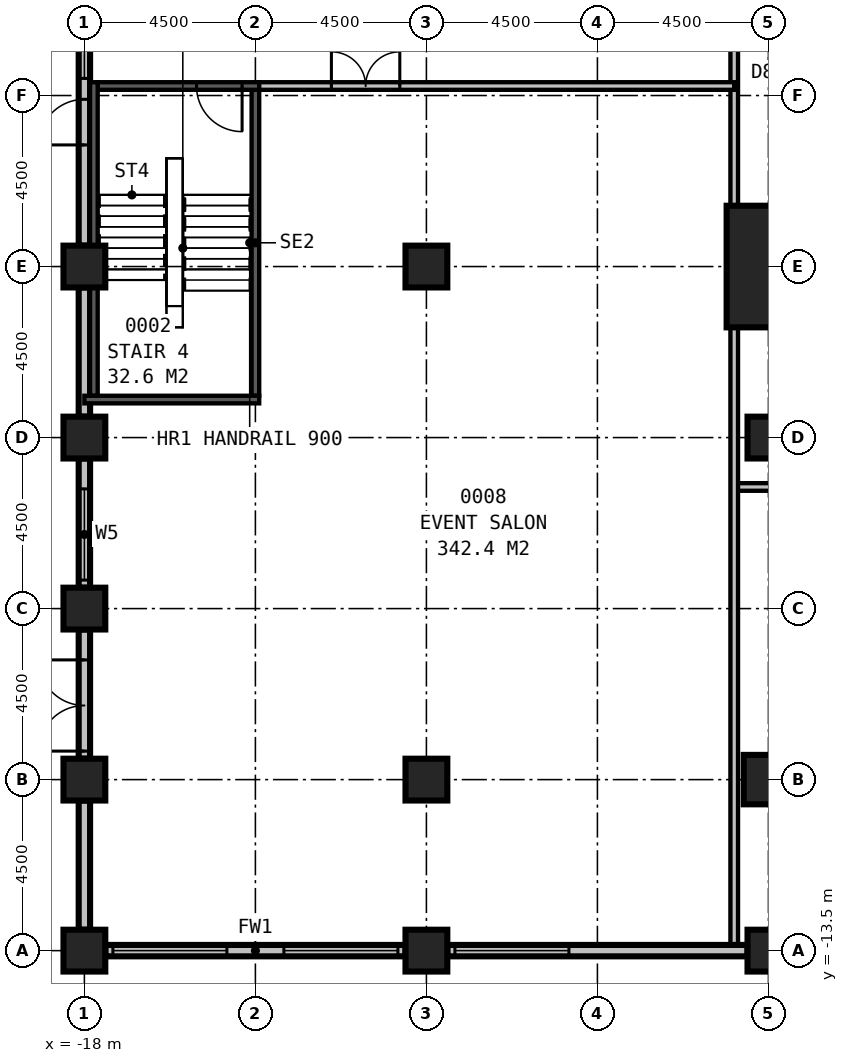
"""IFC4 building model, lengths in metres.
Left out: names, types, materials, properties, quantities, classifications, styles, units other than length and angle.
Written with IfcOpenShell. Run it as: python <this file> out.ifc"""

import sys

from ifc_helpers import new_model, si_unit, direction, frame, frame_2d, origin, origin_2d, place, context, subcontext, project, spatial, rectangle, extrude, element, fill, save


model = new_model("IFC4")
c1 = context("Model", 3, precision=1e-05, world=origin(), true_north=direction((0.0, 1.0)))
c2 = subcontext(c1, "Body", "Model", "MODEL_VIEW")
j1 = project(units=[si_unit("LENGTHUNIT", "METRE"), si_unit("PLANEANGLEUNIT", "RADIAN")], contexts=[c1])
p1 = place(None, origin())
s1 = spatial("IfcSite", under=j1, at=p1, CompositionType="ELEMENT")
p2 = place(p1, origin())
s2 = spatial("IfcBuilding", under=s1, at=p2, CompositionType="ELEMENT")
p3 = place(p2, origin())
s3 = spatial("IfcBuildingStorey", under=s2, at=p3, CompositionType="ELEMENT", Elevation=0.0)
p4 = place(p3, frame((0.5, 4.5, 0.0), z_axis=(0.0, 0.0, 1.0), x_axis=(1.0, 0.0, 0.0)))
e1 = element("IfcColumn", 1, at=p4, inside=s3, PredefinedType="COLUMN", context=c2, shape_type="SweptSolid", body=[
    extrude(rectangle(XDim=3.2, YDim=3.2, at=origin_2d()), origin(), (0.0, 0.0, 1.0), 6.0),
])
for number, where, z_axis, x_axis in (
    (2, (-18.0, -13.5, 0.0), (0.0, 0.0, 1.0), (1.0, 0.0, 0.0)),
    (3, (-9.0, -13.5, 0.0), (0.0, 0.0, 1.0), (1.0, 0.0, 0.0)),
    (4, (-18.0, -4.5, 0.0), (0.0, 0.0, 1.0), (1.0, 0.0, 0.0)),
    (5, (-18.0, 4.5, 0.0), (0.0, 0.0, 1.0), (1.0, 0.0, 0.0)),
    (6, (-9.0, 4.5, 0.0), (0.0, 0.0, 1.0), (1.0, 0.0, 0.0)),
    (7, (-18.0, 0.0, 0.0), (0.0, 0.0, 1.0), (1.0, 0.0, 0.0)),
    (8, (0.0, -13.5, 0.0), (0.0, 0.0, 1.0), (1.0, 0.0, 0.0)),
):
    element("IfcColumn", number, at=place(p3, frame(where, z_axis=z_axis, x_axis=x_axis)), inside=s3, PredefinedType="COLUMN", context=c2, shape_type="SweptSolid", body=[
        extrude(rectangle(XDim=1.1, YDim=1.1, at=origin_2d()), origin(), (0.0, 0.0, 1.0), 6.0),
    ])
p5 = place(p3, frame((0.0, -9.0, 0.0), z_axis=(0.0, 0.0, 1.0), x_axis=(1.0, 0.0, 0.0)))
e9 = element("IfcColumn", 9, at=p5, inside=s3, PredefinedType="COLUMN", context=c2, shape_type="SweptSolid", body=[
    extrude(rectangle(XDim=1.3, YDim=1.3, at=origin_2d()), origin(), (0.0, 0.0, 1.0), 6.0),
])
for number, where, z_axis, x_axis in (
    (10, (-18.0, -9.0, 0.0), (0.0, 0.0, 1.0), (1.0, 0.0, 0.0)),
    (11, (-9.0, -9.0, 0.0), (0.0, 0.0, 1.0), (1.0, 0.0, 0.0)),
    (12, (0.0, 0.0, 0.0), (0.0, 0.0, 1.0), (1.0, 0.0, 0.0)),
):
    element("IfcColumn", number, at=place(p3, frame(where, z_axis=z_axis, x_axis=x_axis)), inside=s3, PredefinedType="COLUMN", context=c2, shape_type="SweptSolid", body=[
        extrude(rectangle(XDim=1.1, YDim=1.1, at=origin_2d()), origin(), (0.0, 0.0, 1.0), 6.0),
    ])
p6 = place(p3, frame((-17.45, -13.5, 0.0), z_axis=(0.0, 0.0, 1.0), x_axis=(1.0, 0.0, 0.0)))
e13 = element("IfcWall", 13, at=p6, inside=s3, PredefinedType="STANDARD", context=c2, shape_type="SweptSolid", body=[
    extrude(rectangle(XDim=7.9, YDim=0.3, at=frame_2d((3.95, 0.0))), origin(), (0.0, 0.0, 1.0), 4.1),
])
p7 = place(p6, frame((0.2, 0.0, 0.5)))
e14 = element("IfcOpeningElement", 14, at=p7, cuts=e13, PredefinedType="OPENING", context=c2, shape_type="SweptSolid", body=[
    extrude(rectangle(XDim=3.0, YDim=3.0, at=frame_2d((1.5, 1.5))), frame((0.0, 0.16, 0.0), z_axis=(0.0, -1.0, 0.0), x_axis=(1.0, 0.0, 0.0)), (0.0, 0.0, 1.0), 0.32),
])
p8 = place(p6, frame((4.7, 0.0, 0.5)))
e15 = element("IfcOpeningElement", 15, at=p8, cuts=e13, PredefinedType="OPENING", context=c2, shape_type="SweptSolid", body=[
    extrude(rectangle(XDim=3.0, YDim=3.0, at=frame_2d((1.5, 1.5))), frame((0.0, 0.16, 0.0), z_axis=(0.0, -1.0, 0.0), x_axis=(1.0, 0.0, 0.0)), (0.0, 0.0, 1.0), 0.32),
])
p9 = place(p3, frame((-8.45, -13.5, 0.0), z_axis=(0.0, 0.0, 1.0), x_axis=(1.0, 0.0, 0.0)))
e16 = element("IfcWall", 16, at=p9, inside=s3, PredefinedType="STANDARD", context=c2, shape_type="SweptSolid", body=[
    extrude(rectangle(XDim=7.9, YDim=0.3, at=frame_2d((3.95, 0.0))), origin(), (0.0, 0.0, 1.0), 4.1),
])
p10 = place(p9, frame((0.2, 0.0, 0.5)))
e17 = element("IfcOpeningElement", 17, at=p10, cuts=e16, PredefinedType="OPENING", context=c2, shape_type="SweptSolid", body=[
    extrude(rectangle(XDim=3.0, YDim=3.0, at=frame_2d((1.5, 1.5))), frame((0.0, 0.16, 0.0), z_axis=(0.0, -1.0, 0.0), x_axis=(1.0, 0.0, 0.0)), (0.0, 0.0, 1.0), 0.32),
])
p11 = place(p3, frame((-18.0, 12.95, 0.0), z_axis=(0.0, 0.0, 1.0), x_axis=(0.0, -1.0, 0.0)))
e18 = element("IfcWall", 18, at=p11, inside=s3, PredefinedType="STANDARD", context=c2, shape_type="SweptSolid", body=[
    extrude(rectangle(XDim=7.9, YDim=0.3, at=frame_2d((3.95, 0.0))), origin(), (0.0, 0.0, 1.0), 4.8),
])
p12 = place(p11, frame((5.25, 0.0, 0.0), z_axis=(0.0, 0.0, 1.0), x_axis=(-1.0, 0.0, 0.0)))
e19 = element("IfcOpeningElement", 19, at=p12, cuts=e18, PredefinedType="OPENING", context=c2, shape_type="SweptSolid", body=[
    extrude(rectangle(XDim=1.2, YDim=2.4, at=frame_2d((0.6, 1.2))), frame((0.0, 0.16, 0.0), z_axis=(0.0, -1.0, 0.0), x_axis=(1.0, 0.0, 0.0)), (0.0, 0.0, 1.0), 0.32),
])
p13 = place(p11, frame((0.5, 0.0, 0.5)))
e20 = element("IfcOpeningElement", 20, at=p13, cuts=e18, PredefinedType="OPENING", context=c2, shape_type="SweptSolid", body=[
    extrude(rectangle(XDim=3.0, YDim=3.0, at=frame_2d((1.5, 1.5))), frame((0.0, 0.16, 0.0), z_axis=(0.0, -1.0, 0.0), x_axis=(1.0, 0.0, 0.0)), (0.0, 0.0, 1.0), 0.32),
])
p14 = place(p3, frame((-18.0, 3.95, 0.0), z_axis=(0.0, 0.0, 1.0), x_axis=(0.0, -1.0, 0.0)))
e21 = element("IfcWall", 21, at=p14, inside=s3, PredefinedType="STANDARD", context=c2, shape_type="SweptSolid", body=[
    extrude(rectangle(XDim=3.4, YDim=0.3, at=frame_2d((1.7, 0.0))), origin(), (0.0, 0.0, 1.0), 4.8),
])
p15 = place(p3, frame((-18.0, -0.55, 0.0), z_axis=(0.0, 0.0, 1.0), x_axis=(0.0, -1.0, 0.0)))
e22 = element("IfcWall", 22, at=p15, inside=s3, PredefinedType="STANDARD", context=c2, shape_type="SweptSolid", body=[
    extrude(rectangle(XDim=3.4, YDim=0.3, at=frame_2d((1.7, 0.0))), origin(), (0.0, 0.0, 1.0), 4.8),
])
p16 = place(p15, frame((0.8, 0.0, 0.5)))
e23 = element("IfcOpeningElement", 23, at=p16, cuts=e22, PredefinedType="OPENING", context=c2, shape_type="SweptSolid", body=[
    extrude(rectangle(XDim=2.4, YDim=3.0, at=frame_2d((1.2, 1.5))), frame((0.0, 0.16, 0.0), z_axis=(0.0, -1.0, 0.0), x_axis=(1.0, 0.0, 0.0)), (0.0, 0.0, 1.0), 0.32),
])
p17 = place(p3, frame((-18.0, -5.05, 0.0), z_axis=(0.0, 0.0, 1.0), x_axis=(0.0, -1.0, 0.0)))
e24 = element("IfcWall", 24, at=p17, inside=s3, PredefinedType="STANDARD", context=c2, shape_type="SweptSolid", body=[
    extrude(rectangle(XDim=3.4, YDim=0.3, at=frame_2d((1.7, 0.0))), origin(), (0.0, 0.0, 1.0), 4.8),
])
p18 = place(p17, frame((3.2, 0.0, 0.0), z_axis=(0.0, 0.0, 1.0), x_axis=(-1.0, 0.0, 0.0)))
e25 = element("IfcOpeningElement", 25, at=p18, cuts=e24, PredefinedType="OPENING", context=c2, shape_type="SweptSolid", body=[
    extrude(rectangle(XDim=2.4, YDim=3.0, at=frame_2d((1.2, 1.5))), frame((0.0, 0.16, 0.0), z_axis=(0.0, -1.0, 0.0), x_axis=(1.0, 0.0, 0.0)), (0.0, 0.0, 1.0), 0.32),
])
p19 = place(p3, frame((-18.0, -9.55, 0.0), z_axis=(0.0, 0.0, 1.0), x_axis=(0.0, -1.0, 0.0)))
e26 = element("IfcWall", 26, at=p19, inside=s3, PredefinedType="STANDARD", context=c2, shape_type="SweptSolid", body=[
    extrude(rectangle(XDim=3.4, YDim=0.3, at=frame_2d((1.7, 0.0))), origin(), (0.0, 0.0, 1.0), 4.8),
])
p20 = place(p3, frame((-17.65, 9.25, 0.0), z_axis=(0.0, 0.0, 1.0), x_axis=(1.0, 0.0, 0.0)))
e27 = element("IfcWall", 27, at=p20, inside=s3, PredefinedType="SOLIDWALL", context=c2, shape_type="SweptSolid", body=[
    extrude(rectangle(XDim=4.25, YDim=0.2, at=frame_2d((2.125, 0.0))), origin(), (0.0, 0.0, 1.0), 5.7),
])
p21 = place(p20, frame((3.8, 0.0, 0.0), z_axis=(0.0, 0.0, 1.0), x_axis=(-1.0, 0.0, 0.0)))
e28 = element("IfcOpeningElement", 28, at=p21, cuts=e27, PredefinedType="OPENING", context=c2, shape_type="SweptSolid", body=[
    extrude(rectangle(XDim=1.2, YDim=2.1, at=frame_2d((0.6, 1.05))), frame((0.0, 0.11, 0.0), z_axis=(0.0, -1.0, 0.0), x_axis=(1.0, 0.0, 0.0)), (0.0, 0.0, 1.0), 0.22),
])
p22 = place(p3, frame((-18.0, 1.0, 0.0), z_axis=(0.0, 0.0, 1.0), x_axis=(1.0, 0.0, 0.0)))
e29 = element("IfcWall", 29, at=p22, inside=s3, PredefinedType="SOLIDWALL", context=c2, shape_type="SweptSolid", body=[
    extrude(rectangle(XDim=4.6, YDim=0.2, at=frame_2d((2.3, 0.0))), origin(), (0.0, 0.0, 1.0), 5.7),
])
p23 = place(p3, frame((-13.5, 1.1, 0.0), z_axis=(0.0, 0.0, 1.0), x_axis=(0.0, 1.0, 0.0)))
e30 = element("IfcWall", 30, at=p23, inside=s3, PredefinedType="SOLIDWALL", context=c2, shape_type="SweptSolid", body=[
    extrude(rectangle(XDim=8.05, YDim=0.2, at=frame_2d((4.025, 0.0))), origin(), (0.0, 0.0, 1.0), 5.7),
])
p24 = place(p3, frame((-17.75, 1.1, 0.0), z_axis=(0.0, 0.0, 1.0), x_axis=(0.0, 1.0, 0.0)))
e31 = element("IfcWall", 31, at=p24, inside=s3, PredefinedType="SOLIDWALL", context=c2, shape_type="SweptSolid", body=[
    extrude(rectangle(XDim=2.85, YDim=0.2, at=frame_2d((1.425, 0.0))), origin(), (0.0, 0.0, 1.0), 5.7),
])
p25 = place(p3, frame((-17.75, 5.05, 0.0), z_axis=(0.0, 0.0, 1.0), x_axis=(0.0, 1.0, 0.0)))
e32 = element("IfcWall", 32, at=p25, inside=s3, PredefinedType="SOLIDWALL", context=c2, shape_type="SweptSolid", body=[
    extrude(rectangle(XDim=4.3, YDim=0.2, at=frame_2d((2.15, 0.0))), origin(), (0.0, 0.0, 1.0), 5.7),
])
p26 = place(p25, frame((2.65, 0.0, 0.0)))
e33 = element("IfcOpeningElement", 33, at=p26, cuts=e32, PredefinedType="OPENING", context=c2, shape_type="SweptSolid", body=[
    extrude(rectangle(XDim=1.2, YDim=2.4, at=frame_2d((0.6, 1.2))), frame((0.0, 0.11, 0.0), z_axis=(0.0, -1.0, 0.0), x_axis=(1.0, 0.0, 0.0)), (0.0, 0.0, 1.0), 0.22),
])
p27 = place(p3, frame((-0.9, -13.5, 0.0), z_axis=(0.0, 0.0, 1.0), x_axis=(0.0, 1.0, 0.0)))
e34 = element("IfcWall", 34, at=p27, inside=s3, PredefinedType="PARTITIONING", context=c2, shape_type="SweptSolid", body=[
    extrude(rectangle(XDim=23.9, YDim=0.2, at=frame_2d((11.95, 0.0))), origin(), (0.0, 0.0, 1.0), 4.8),
])
p28 = place(p3, frame((-13.5, 9.25, 0.0), z_axis=(0.0, 0.0, 1.0), x_axis=(1.0, 0.0, 0.0)))
e35 = element("IfcWall", 35, at=p28, inside=s3, PredefinedType="PARTITIONING", context=c2, shape_type="SweptSolid", body=[
    extrude(rectangle(XDim=12.6, YDim=0.2, at=frame_2d((6.3, 0.0))), origin(), (0.0, 0.0, 1.0), 5.7),
])
p29 = place(p28, frame((2.0, 0.0, 0.0)))
e36 = element("IfcOpeningElement", 36, at=p29, cuts=e35, PredefinedType="OPENING", context=c2, shape_type="SweptSolid", body=[
    extrude(rectangle(XDim=1.8, YDim=2.4, at=frame_2d((0.9, 1.2))), frame((0.0, 0.11, 0.0), z_axis=(0.0, -1.0, 0.0), x_axis=(1.0, 0.0, 0.0)), (0.0, 0.0, 1.0), 0.22),
])
p30 = place(p3, frame((-0.9, -1.3, 0.0), z_axis=(0.0, 0.0, 1.0), x_axis=(1.0, 0.0, 0.0)))
e37 = element("IfcWall", 37, at=p30, inside=s3, PredefinedType="PARTITIONING", context=c2, shape_type="SweptSolid", body=[
    extrude(rectangle(XDim=4.1, YDim=0.2, at=frame_2d((2.05, 0.0))), origin(), (0.0, 0.0, 1.0), 4.8),
])
p31 = place(p7, origin())
e38 = element("IfcWindow", 38, at=p31, inside=s3, PartitioningType="SINGLE_PANEL", PredefinedType="WINDOW", context=c2, shape_type="SweptSolid", body=[
    extrude(rectangle(XDim=3.0, YDim=3.0, at=frame_2d((1.5, 1.5))), frame((0.0, 0.03, 0.0), z_axis=(0.0, -1.0, 0.0), x_axis=(1.0, 0.0, 0.0)), (0.0, 0.0, 1.0), 0.06),
])
fill(e14, e38)
p32 = place(p8, origin())
e39 = element("IfcWindow", 39, at=p32, inside=s3, PartitioningType="SINGLE_PANEL", PredefinedType="WINDOW", context=c2, shape_type="SweptSolid", body=[
    extrude(rectangle(XDim=3.0, YDim=3.0, at=frame_2d((1.5, 1.5))), frame((0.0, 0.03, 0.0), z_axis=(0.0, -1.0, 0.0), x_axis=(1.0, 0.0, 0.0)), (0.0, 0.0, 1.0), 0.06),
])
fill(e15, e39)
p33 = place(p10, origin())
e40 = element("IfcWindow", 40, at=p33, inside=s3, PartitioningType="SINGLE_PANEL", PredefinedType="WINDOW", context=c2, shape_type="SweptSolid", body=[
    extrude(rectangle(XDim=3.0, YDim=3.0, at=frame_2d((1.5, 1.5))), frame((0.0, 0.03, 0.0), z_axis=(0.0, -1.0, 0.0), x_axis=(1.0, 0.0, 0.0)), (0.0, 0.0, 1.0), 0.06),
])
fill(e17, e40)
p34 = place(p12, origin())
e41 = element("IfcDoor", 41, at=p34, inside=s3, OperationType="SINGLE_SWING_LEFT", PredefinedType="DOOR", context=c2, shape_type="SweptSolid", body=[
    extrude(rectangle(XDim=1.2, YDim=2.4, at=frame_2d((0.6, 1.2))), frame((0.0, 0.025, 0.0), z_axis=(0.0, -1.0, 0.0), x_axis=(1.0, 0.0, 0.0)), (0.0, 0.0, 1.0), 0.05),
])
fill(e19, e41)
p35 = place(p18, origin())
e42 = element("IfcDoor", 42, at=p35, inside=s3, OperationType="DOUBLE_DOOR_SINGLE_SWING", PredefinedType="DOOR", context=c2, shape_type="SweptSolid", body=[
    extrude(rectangle(XDim=2.4, YDim=3.0, at=frame_2d((1.2, 1.5))), frame((0.0, 0.025, 0.0), z_axis=(0.0, -1.0, 0.0), x_axis=(1.0, 0.0, 0.0)), (0.0, 0.0, 1.0), 0.05),
])
fill(e25, e42)
p36 = place(p13, origin())
e43 = element("IfcWindow", 43, at=p36, inside=s3, PartitioningType="SINGLE_PANEL", PredefinedType="WINDOW", context=c2, shape_type="SweptSolid", body=[
    extrude(rectangle(XDim=3.0, YDim=3.0, at=frame_2d((1.5, 1.5))), frame((0.0, 0.03, 0.0), z_axis=(0.0, -1.0, 0.0), x_axis=(1.0, 0.0, 0.0)), (0.0, 0.0, 1.0), 0.06),
])
fill(e20, e43)
p37 = place(p16, origin())
e44 = element("IfcWindow", 44, at=p37, inside=s3, PartitioningType="SINGLE_PANEL", PredefinedType="WINDOW", context=c2, shape_type="SweptSolid", body=[
    extrude(rectangle(XDim=2.4, YDim=3.0, at=frame_2d((1.2, 1.5))), frame((0.0, 0.03, 0.0), z_axis=(0.0, -1.0, 0.0), x_axis=(1.0, 0.0, 0.0)), (0.0, 0.0, 1.0), 0.06),
])
fill(e23, e44)
p38 = place(p21, origin())
e45 = element("IfcDoor", 45, at=p38, inside=s3, OperationType="SINGLE_SWING_LEFT", PredefinedType="DOOR", context=c2, shape_type="SweptSolid", body=[
    extrude(rectangle(XDim=1.2, YDim=2.1, at=frame_2d((0.6, 1.05))), frame((0.0, 0.025, 0.0), z_axis=(0.0, -1.0, 0.0), x_axis=(1.0, 0.0, 0.0)), (0.0, 0.0, 1.0), 0.05),
])
fill(e28, e45)
p39 = place(p29, origin())
e46 = element("IfcDoor", 46, at=p39, inside=s3, OperationType="DOUBLE_DOOR_SINGLE_SWING", PredefinedType="DOOR", context=c2, shape_type="SweptSolid", body=[
    extrude(rectangle(XDim=1.8, YDim=2.4, at=frame_2d((0.9, 1.2))), frame((0.0, 0.025, 0.0), z_axis=(0.0, -1.0, 0.0), x_axis=(1.0, 0.0, 0.0)), (0.0, 0.0, 1.0), 0.05),
])
fill(e36, e46)
save(model, sys.argv[1])
